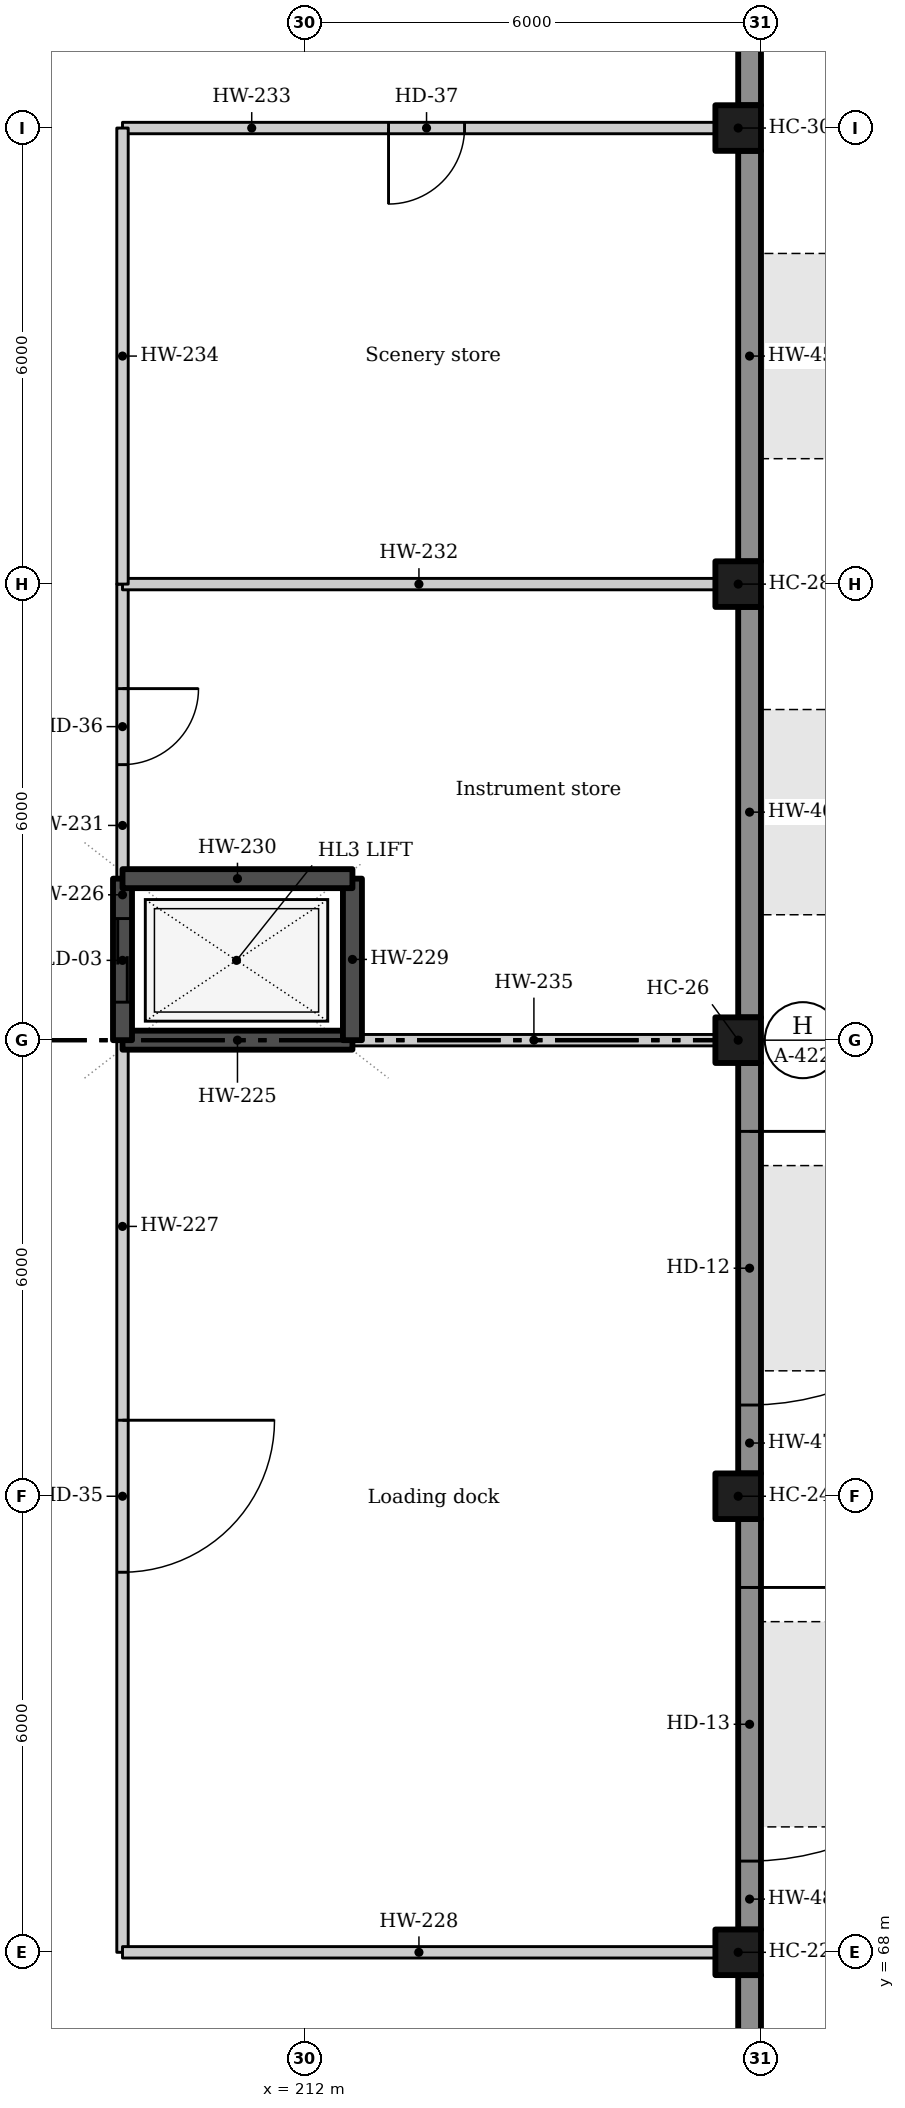
"""IFC4 building model, lengths in metres.
Left out: names, types, materials, properties, quantities, classifications, styles, units other than length and angle.
Written with IfcOpenShell. Run it as: python <this file> out.ifc"""

import sys

from ifc_helpers import new_model, si_unit, direction, frame, frame_2d, origin, origin_2d, place, context, subcontext, project, spatial, rectangle, extrude, element, fill, save


model = new_model("IFC4")
c1 = context("Model", 3, precision=1e-05, world=origin(), true_north=direction((0.0, 1.0)))
c2 = subcontext(c1, "Body", "Model", "MODEL_VIEW")
j1 = project(units=[si_unit("LENGTHUNIT", "METRE"), si_unit("PLANEANGLEUNIT", "RADIAN")], contexts=[c1])
p1 = place(None, origin())
s1 = spatial("IfcSite", under=j1, at=p1, CompositionType="ELEMENT")
p2 = place(p1, origin())
s2 = spatial("IfcBuilding", under=s1, at=p2, CompositionType="ELEMENT")
p3 = place(p2, origin())
s3 = spatial("IfcBuildingStorey", under=s2, at=p3, CompositionType="ELEMENT", Elevation=0.0)
for number, where, z_axis, x_axis in (
    (1, (217.7, 68.0, 0.0), (0.0, 0.0, 1.0), (1.0, 0.0, 0.0)),
    (2, (217.7, 74.0, 0.0), (0.0, 0.0, 1.0), (1.0, 0.0, 0.0)),
    (3, (217.7, 80.0, 0.0), (0.0, 0.0, 1.0), (1.0, 0.0, 0.0)),
    (4, (217.7, 86.0, 0.0), (0.0, 0.0, 1.0), (1.0, 0.0, 0.0)),
    (5, (217.7, 92.0, 0.0), (0.0, 0.0, 1.0), (1.0, 0.0, 0.0)),
):
    element("IfcColumn", number, at=place(p3, frame(where, z_axis=z_axis, x_axis=x_axis)), inside=s3, PredefinedType="COLUMN", context=c2, shape_type="SweptSolid", body=[
        extrude(rectangle(XDim=0.6, YDim=0.6, at=origin_2d()), origin(), (0.0, 0.0, 1.0), 6.6),
    ])
p4 = place(p3, frame((217.85, 101.0, 0.0), z_axis=(0.0, 0.0, 1.0), x_axis=(0.0, -1.0, 0.0)))
e6 = element("IfcWall", 6, at=p4, inside=s3, PredefinedType="SOLIDWALL", context=c2, shape_type="SweptSolid", body=[
    extrude(rectangle(XDim=8.7, YDim=0.3, at=frame_2d((4.35, 0.0))), origin(), (0.0, 0.0, 1.0), 6.6),
])
p5 = place(p4, frame((3.96, 0.0, 0.0)))
e7 = element("IfcOpeningElement", 7, at=p5, cuts=e6, PredefinedType="OPENING", context=c2, shape_type="SweptSolid", body=[
    extrude(rectangle(XDim=1.6, YDim=2.4, at=frame_2d((0.8, 1.2))), frame((0.0, 0.16, 0.0), z_axis=(0.0, -1.0, 0.0), x_axis=(1.0, 0.0, 0.0)), (0.0, 0.0, 1.0), 0.32),
])
for number, where, z_axis, x_axis in (
    (8, (217.85, 91.7, 0.0), (0.0, 0.0, 1.0), (0.0, -1.0, 0.0)),
    (9, (217.85, 85.7, 0.0), (0.0, 0.0, 1.0), (0.0, -1.0, 0.0)),
):
    element("IfcWall", number, at=place(p3, frame(where, z_axis=z_axis, x_axis=x_axis)), inside=s3, PredefinedType="SOLIDWALL", context=c2, shape_type="SweptSolid", body=[
        extrude(rectangle(XDim=5.4, YDim=0.3, at=frame_2d((2.7, 0.0))), origin(), (0.0, 0.0, 1.0), 6.6),
    ])
p6 = place(p3, frame((217.85, 79.7, 0.0), z_axis=(0.0, 0.0, 1.0), x_axis=(0.0, -1.0, 0.0)))
e10 = element("IfcWall", 10, at=p6, inside=s3, PredefinedType="SOLIDWALL", context=c2, shape_type="SweptSolid", body=[
    extrude(rectangle(XDim=5.4, YDim=0.3, at=frame_2d((2.7, 0.0))), origin(), (0.0, 0.0, 1.0), 6.6),
])
p7 = place(p6, frame((0.9, 0.0, 0.0)))
e11 = element("IfcOpeningElement", 11, at=p7, cuts=e10, PredefinedType="OPENING", context=c2, shape_type="SweptSolid", body=[
    extrude(rectangle(XDim=3.6, YDim=4.2, at=frame_2d((1.8, 2.1))), frame((0.0, 0.16, 0.0), z_axis=(0.0, -1.0, 0.0), x_axis=(1.0, 0.0, 0.0)), (0.0, 0.0, 1.0), 0.32),
])
p8 = place(p3, frame((217.85, 73.7, 0.0), z_axis=(0.0, 0.0, 1.0), x_axis=(0.0, -1.0, 0.0)))
e12 = element("IfcWall", 12, at=p8, inside=s3, PredefinedType="SOLIDWALL", context=c2, shape_type="SweptSolid", body=[
    extrude(rectangle(XDim=5.4, YDim=0.3, at=frame_2d((2.7, 0.0))), origin(), (0.0, 0.0, 1.0), 6.6),
])
p9 = place(p8, frame((0.9, 0.0, 0.0)))
e13 = element("IfcOpeningElement", 13, at=p9, cuts=e12, PredefinedType="OPENING", context=c2, shape_type="SweptSolid", body=[
    extrude(rectangle(XDim=3.6, YDim=4.2, at=frame_2d((1.8, 2.1))), frame((0.0, 0.16, 0.0), z_axis=(0.0, -1.0, 0.0), x_axis=(1.0, 0.0, 0.0)), (0.0, 0.0, 1.0), 0.32),
])
p10 = place(p3, frame((217.85, 67.7, 0.0), z_axis=(0.0, 0.0, 1.0), x_axis=(0.0, -1.0, 0.0)))
e14 = element("IfcWall", 14, at=p10, inside=s3, PredefinedType="SOLIDWALL", context=c2, shape_type="SweptSolid", body=[
    extrude(rectangle(XDim=8.7, YDim=0.3, at=frame_2d((4.35, 0.0))), origin(), (0.0, 0.0, 1.0), 6.6),
])
p11 = place(p10, frame((3.14, 0.0, 0.0)))
e15 = element("IfcOpeningElement", 15, at=p11, cuts=e14, PredefinedType="OPENING", context=c2, shape_type="SweptSolid", body=[
    extrude(rectangle(XDim=1.6, YDim=2.4, at=frame_2d((0.8, 1.2))), frame((0.0, 0.16, 0.0), z_axis=(0.0, -1.0, 0.0), x_axis=(1.0, 0.0, 0.0)), (0.0, 0.0, 1.0), 0.32),
])
p12 = place(p3, frame((209.6, 80.0, 0.0), z_axis=(0.0, 0.0, 1.0), x_axis=(1.0, 0.0, 0.0)))
e16 = element("IfcWall", 16, at=p12, inside=s3, PredefinedType="SOLIDWALL", context=c2, shape_type="SweptSolid", body=[
    extrude(rectangle(XDim=3.025, YDim=0.25, at=frame_2d((1.512, 0.0))), origin(), (0.0, 0.0, 1.0), 6.6),
])
p13 = place(p3, frame((209.6, 82.125, 0.0), z_axis=(0.0, 0.0, 1.0), x_axis=(0.0, -1.0, 0.0)))
e17 = element("IfcWall", 17, at=p13, inside=s3, PredefinedType="SOLIDWALL", context=c2, shape_type="SweptSolid", body=[
    extrude(rectangle(XDim=2.125, YDim=0.25, at=frame_2d((1.062, 0.0))), origin(), (0.0, 0.0, 1.0), 6.6),
])
p14 = place(p13, frame((0.525, 0.0, 0.0)))
e18 = element("IfcOpeningElement", 18, at=p14, cuts=e17, PredefinedType="OPENING", context=c2, shape_type="SweptSolid", body=[
    extrude(rectangle(XDim=1.1, YDim=2.1, at=frame_2d((0.55, 1.05))), frame((0.0, 0.135, 0.0), z_axis=(0.0, -1.0, 0.0), x_axis=(1.0, 0.0, 0.0)), (0.0, 0.0, 1.0), 0.27),
])
p15 = place(p3, frame((209.6, 80.0, 0.0), z_axis=(0.0, 0.0, 1.0), x_axis=(0.0, -1.0, 0.0)))
e19 = element("IfcWall", 19, at=p15, inside=s3, PredefinedType="PARTITIONING", context=c2, shape_type="SweptSolid", body=[
    extrude(rectangle(XDim=12.0, YDim=0.15, at=frame_2d((6.0, 0.0))), origin(), (0.0, 0.0, 1.0), 6.25),
])
p16 = place(p15, frame((5.0, 0.0, 0.0)))
e20 = element("IfcOpeningElement", 20, at=p16, cuts=e19, PredefinedType="OPENING", context=c2, shape_type="SweptSolid", body=[
    extrude(rectangle(XDim=2.0, YDim=2.6, at=frame_2d((1.0, 1.3))), frame((0.0, 0.085, 0.0), z_axis=(0.0, -1.0, 0.0), x_axis=(1.0, 0.0, 0.0)), (0.0, 0.0, 1.0), 0.17),
])
p17 = place(p3, frame((209.6, 68.0, 0.0), z_axis=(0.0, 0.0, 1.0), x_axis=(1.0, 0.0, 0.0)))
e21 = element("IfcWall", 21, at=p17, inside=s3, PredefinedType="PARTITIONING", context=c2, shape_type="SweptSolid", body=[
    extrude(rectangle(XDim=7.8, YDim=0.15, at=frame_2d((3.9, 0.0))), origin(), (0.0, 0.0, 1.0), 6.25),
])
p18 = place(p3, frame((212.625, 80.0, 0.0), z_axis=(0.0, 0.0, 1.0), x_axis=(0.0, 1.0, 0.0)))
e22 = element("IfcWall", 22, at=p18, inside=s3, PredefinedType="SOLIDWALL", context=c2, shape_type="SweptSolid", body=[
    extrude(rectangle(XDim=2.125, YDim=0.25, at=frame_2d((1.062, 0.0))), origin(), (0.0, 0.0, 1.0), 6.6),
])
p19 = place(p3, frame((212.625, 82.125, 0.0), z_axis=(0.0, 0.0, 1.0), x_axis=(-1.0, 0.0, 0.0)))
e23 = element("IfcWall", 23, at=p19, inside=s3, PredefinedType="SOLIDWALL", context=c2, shape_type="SweptSolid", body=[
    extrude(rectangle(XDim=3.025, YDim=0.25, at=frame_2d((1.512, 0.0))), origin(), (0.0, 0.0, 1.0), 6.6),
])
p20 = place(p3, frame((209.6, 86.0, 0.0), z_axis=(0.0, 0.0, 1.0), x_axis=(0.0, -1.0, 0.0)))
e24 = element("IfcWall", 24, at=p20, inside=s3, PredefinedType="PARTITIONING", context=c2, shape_type="SweptSolid", body=[
    extrude(rectangle(XDim=3.875, YDim=0.15, at=frame_2d((1.938, 0.0))), origin(), (0.0, 0.0, 1.0), 6.25),
])
p21 = place(p20, frame((1.375, 0.0, 0.0)))
e25 = element("IfcOpeningElement", 25, at=p21, cuts=e24, PredefinedType="OPENING", context=c2, shape_type="SweptSolid", body=[
    extrude(rectangle(XDim=1.0, YDim=2.1, at=frame_2d((0.5, 1.05))), frame((0.0, 0.085, 0.0), z_axis=(0.0, -1.0, 0.0), x_axis=(1.0, 0.0, 0.0)), (0.0, 0.0, 1.0), 0.17),
])
p22 = place(p3, frame((209.6, 86.0, 0.0), z_axis=(0.0, 0.0, 1.0), x_axis=(1.0, 0.0, 0.0)))
e26 = element("IfcWall", 26, at=p22, inside=s3, PredefinedType="PARTITIONING", context=c2, shape_type="SweptSolid", body=[
    extrude(rectangle(XDim=7.8, YDim=0.15, at=frame_2d((3.9, 0.0))), origin(), (0.0, 0.0, 1.0), 6.25),
])
p23 = place(p3, frame((217.4, 92.0, 0.0), z_axis=(0.0, 0.0, 1.0), x_axis=(-1.0, 0.0, 0.0)))
e27 = element("IfcWall", 27, at=p23, inside=s3, PredefinedType="PARTITIONING", context=c2, shape_type="SweptSolid", body=[
    extrude(rectangle(XDim=7.8, YDim=0.15, at=frame_2d((3.9, 0.0))), origin(), (0.0, 0.0, 1.0), 6.25),
])
p24 = place(p23, frame((3.3, 0.0, 0.0)))
e28 = element("IfcOpeningElement", 28, at=p24, cuts=e27, PredefinedType="OPENING", context=c2, shape_type="SweptSolid", body=[
    extrude(rectangle(XDim=1.0, YDim=2.1, at=frame_2d((0.5, 1.05))), frame((0.0, 0.085, 0.0), z_axis=(0.0, -1.0, 0.0), x_axis=(1.0, 0.0, 0.0)), (0.0, 0.0, 1.0), 0.17),
])
p25 = place(p3, frame((209.6, 92.0, 0.0), z_axis=(0.0, 0.0, 1.0), x_axis=(0.0, -1.0, 0.0)))
e29 = element("IfcWall", 29, at=p25, inside=s3, PredefinedType="PARTITIONING", context=c2, shape_type="SweptSolid", body=[
    extrude(rectangle(XDim=6.0, YDim=0.15, at=frame_2d((3.0, 0.0))), origin(), (0.0, 0.0, 1.0), 6.25),
])
p26 = place(p3, frame((212.625, 80.0, 0.0), z_axis=(0.0, 0.0, 1.0), x_axis=(1.0, 0.0, 0.0)))
e30 = element("IfcWall", 30, at=p26, inside=s3, PredefinedType="PARTITIONING", context=c2, shape_type="SweptSolid", body=[
    extrude(rectangle(XDim=4.775, YDim=0.15, at=frame_2d((2.387, 0.0))), origin(), (0.0, 0.0, 1.0), 6.25),
])
p27 = place(p7, origin())
e31 = element("IfcDoor", 31, at=p27, inside=s3, OperationType="SINGLE_SWING_LEFT", PredefinedType="DOOR", context=c2, shape_type="SweptSolid", body=[
    extrude(rectangle(XDim=3.6, YDim=4.2, at=frame_2d((1.8, 2.1))), frame((0.0, 0.025, 0.0), z_axis=(0.0, -1.0, 0.0), x_axis=(1.0, 0.0, 0.0)), (0.0, 0.0, 1.0), 0.05),
])
fill(e11, e31)
p28 = place(p9, origin())
e32 = element("IfcDoor", 32, at=p28, inside=s3, OperationType="SINGLE_SWING_LEFT", PredefinedType="DOOR", context=c2, shape_type="SweptSolid", body=[
    extrude(rectangle(XDim=3.6, YDim=4.2, at=frame_2d((1.8, 2.1))), frame((0.0, 0.025, 0.0), z_axis=(0.0, -1.0, 0.0), x_axis=(1.0, 0.0, 0.0)), (0.0, 0.0, 1.0), 0.05),
])
fill(e13, e32)
p29 = place(p14, origin())
e33 = element("IfcDoor", 33, at=p29, inside=s3, OperationType="SLIDING_TO_LEFT", PredefinedType="DOOR", context=c2, shape_type="SweptSolid", body=[
    extrude(rectangle(XDim=1.1, YDim=2.1, at=frame_2d((0.55, 1.05))), frame((0.0, 0.025, 0.0), z_axis=(0.0, -1.0, 0.0), x_axis=(1.0, 0.0, 0.0)), (0.0, 0.0, 1.0), 0.05),
])
fill(e18, e33)
p30 = place(p16, origin())
e34 = element("IfcDoor", 34, at=p30, inside=s3, OperationType="DOUBLE_DOOR_SINGLE_SWING", PredefinedType="DOOR", context=c2, shape_type="SweptSolid", body=[
    extrude(rectangle(XDim=2.0, YDim=2.6, at=frame_2d((1.0, 1.3))), frame((0.0, 0.025, 0.0), z_axis=(0.0, -1.0, 0.0), x_axis=(1.0, 0.0, 0.0)), (0.0, 0.0, 1.0), 0.05),
])
fill(e20, e34)
p31 = place(p21, origin())
e35 = element("IfcDoor", 35, at=p31, inside=s3, OperationType="SINGLE_SWING_LEFT", PredefinedType="DOOR", context=c2, shape_type="SweptSolid", body=[
    extrude(rectangle(XDim=1.0, YDim=2.1, at=frame_2d((0.5, 1.05))), frame((0.0, 0.025, 0.0), z_axis=(0.0, -1.0, 0.0), x_axis=(1.0, 0.0, 0.0)), (0.0, 0.0, 1.0), 0.05),
])
fill(e25, e35)
p32 = place(p24, origin())
e36 = element("IfcDoor", 36, at=p32, inside=s3, OperationType="SINGLE_SWING_RIGHT", PredefinedType="DOOR", context=c2, shape_type="SweptSolid", body=[
    extrude(rectangle(XDim=1.0, YDim=2.1, at=frame_2d((0.5, 1.05))), frame((0.0, 0.025, 0.0), z_axis=(0.0, -1.0, 0.0), x_axis=(1.0, 0.0, 0.0)), (0.0, 0.0, 1.0), 0.05),
])
fill(e28, e36)
save(model, sys.argv[1])
